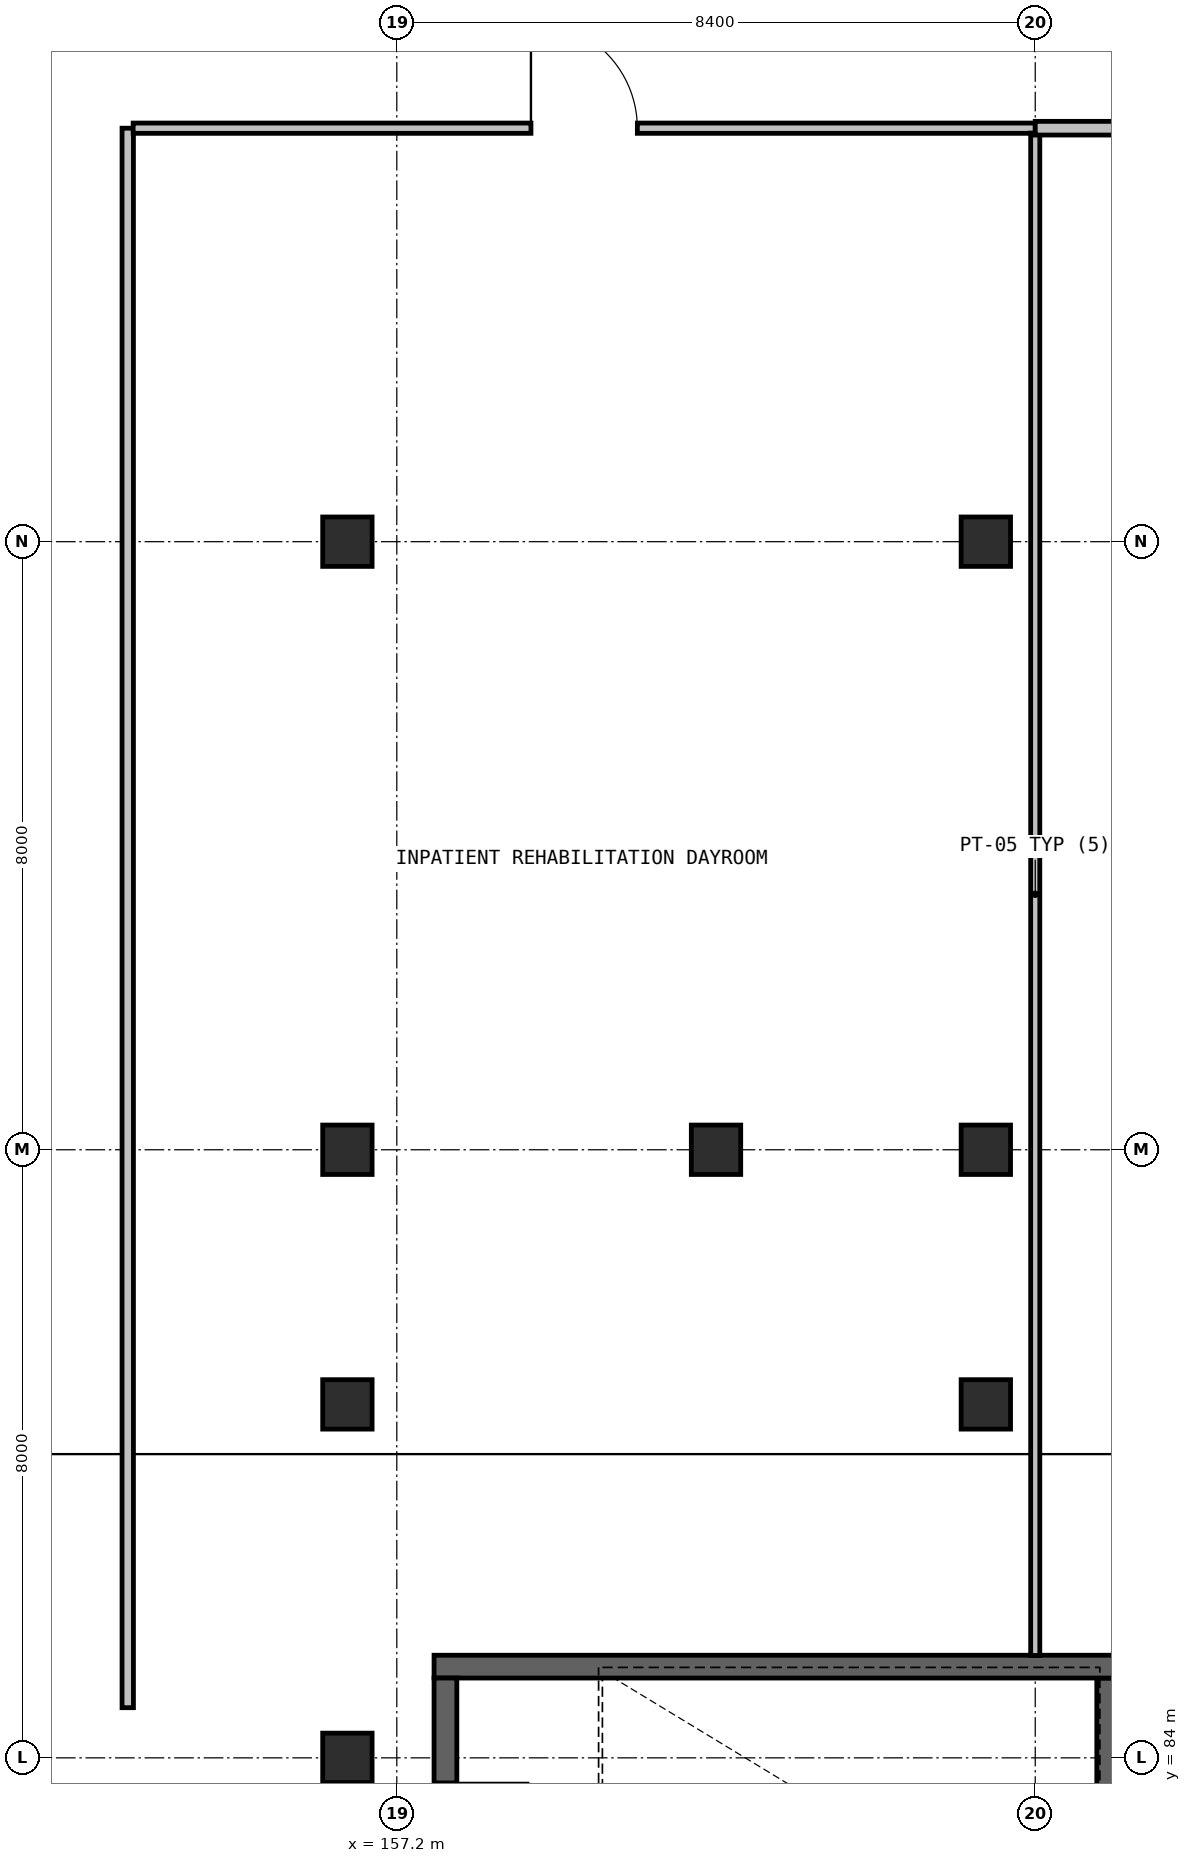
"""IFC4 building model, lengths in metres.
Left out: names, types, materials, properties, quantities, classifications, styles, units other than length and angle.
Written with IfcOpenShell. Run it as: python <this file> out.ifc"""

import sys

from ifc_helpers import new_model, si_unit, direction, frame, frame_2d, origin, origin_2d, place, context, subcontext, project, spatial, rectangle, extrude, element, fill, save


model = new_model("IFC4")
c1 = context("Model", 3, precision=1e-05, world=origin(), true_north=direction((0.0, 1.0)))
c2 = subcontext(c1, "Body", "Model", "MODEL_VIEW")
j1 = project(units=[si_unit("LENGTHUNIT", "METRE"), si_unit("PLANEANGLEUNIT", "RADIAN")], contexts=[c1])
p1 = place(None, origin())
s1 = spatial("IfcSite", under=j1, at=p1, CompositionType="ELEMENT")
p2 = place(p1, origin())
s2 = spatial("IfcBuilding", under=s1, at=p2, CompositionType="ELEMENT")
p3 = place(p2, frame((0.0, 0.0, 23.25)))
s3 = spatial("IfcBuildingStorey", under=s2, at=p3, CompositionType="ELEMENT", Elevation=23.25)
p4 = place(p3, frame((161.4, 92.0, 0.0), z_axis=(0.0, 0.0, 1.0), x_axis=(1.0, 0.0, 0.0)))
e1 = element("IfcColumn", 1, at=p4, inside=s3, PredefinedType="COLUMN", context=c2, shape_type="SweptSolid", body=[
    extrude(rectangle(XDim=0.65, YDim=0.65, at=origin_2d()), origin(), (0.0, 0.0, 1.0), 4.05),
])
p5 = place(p3, frame((156.55, 84.0, 0.0), z_axis=(0.0, 0.0, 1.0), x_axis=(1.0, 0.0, 0.0)))
e2 = element("IfcColumn", 2, at=p5, inside=s3, PredefinedType="COLUMN", context=c2, shape_type="SweptSolid", body=[
    extrude(rectangle(XDim=0.65, YDim=0.65, at=origin_2d()), origin(), (0.0, 0.0, 1.0), 3.762),
])
for number, where, z_axis, x_axis in (
    (3, (156.55, 88.65, 0.0), (0.0, 0.0, 1.0), (1.0, 0.0, 0.0)),
    (4, (156.55, 92.0, 0.0), (0.0, 0.0, 1.0), (1.0, 0.0, 0.0)),
    (5, (156.55, 100.0, 0.0), (0.0, 0.0, 1.0), (1.0, 0.0, 0.0)),
    (6, (164.95, 88.65, 0.0), (0.0, 0.0, 1.0), (1.0, 0.0, 0.0)),
    (7, (164.95, 92.0, 0.0), (0.0, 0.0, 1.0), (1.0, 0.0, 0.0)),
    (8, (164.95, 100.0, 0.0), (0.0, 0.0, 1.0), (1.0, 0.0, 0.0)),
):
    element("IfcColumn", number, at=place(p3, frame(where, z_axis=z_axis, x_axis=x_axis)), inside=s3, PredefinedType="COLUMN", context=c2, shape_type="SweptSolid", body=[
        extrude(rectangle(XDim=0.65, YDim=0.65, at=origin_2d()), origin(), (0.0, 0.0, 1.0), 4.05),
    ])
p6 = place(p3, frame((166.56, 81.19, 0.0), z_axis=(0.0, 0.0, 1.0), x_axis=(0.0, 1.0, 0.0)))
e9 = element("IfcWall", 9, at=p6, inside=s3, PredefinedType="SHEAR", context=c2, shape_type="SweptSolid", body=[
    extrude(rectangle(XDim=3.86, YDim=0.3, at=frame_2d((1.93, 0.0))), origin(), (0.0, 0.0, 1.0), 3.775),
])
p7 = place(p3, frame((166.71, 85.2, 0.0), z_axis=(0.0, 0.0, 1.0), x_axis=(-1.0, 0.0, 0.0)))
e10 = element("IfcWall", 10, at=p7, inside=s3, PredefinedType="SHEAR", context=c2, shape_type="SweptSolid", body=[
    extrude(rectangle(XDim=9.02, YDim=0.3, at=frame_2d((4.51, 0.0))), origin(), (0.0, 0.0, 1.0), 3.775),
])
p8 = place(p3, frame((157.84, 85.05, 0.0), z_axis=(0.0, 0.0, 1.0), x_axis=(0.0, -1.0, 0.0)))
e11 = element("IfcWall", 11, at=p8, inside=s3, PredefinedType="SHEAR", context=c2, shape_type="SweptSolid", body=[
    extrude(rectangle(XDim=3.86, YDim=0.3, at=frame_2d((1.93, 0.0))), origin(), (0.0, 0.0, 1.0), 3.775),
])
p9 = place(p8, frame((1.38, 0.0, 0.0)))
e12 = element("IfcOpeningElement", 12, at=p9, cuts=e11, PredefinedType="OPENING", context=c2, shape_type="SweptSolid", body=[
    extrude(rectangle(XDim=1.1, YDim=2.15, at=frame_2d((0.55, 1.075))), frame((0.0, 0.16, 0.0), z_axis=(0.0, -1.0, 0.0), x_axis=(1.0, 0.0, 0.0)), (0.0, 0.0, 1.0), 0.32),
])
p10 = place(p3, frame((153.66, 84.66, 0.0), z_axis=(0.0, 0.0, 1.0), x_axis=(0.0, 1.0, 0.0)))
e13 = element("IfcWall", 13, at=p10, inside=s3, PredefinedType="PARTITIONING", context=c2, shape_type="SweptSolid", body=[
    extrude(rectangle(XDim=20.78, YDim=0.15, at=frame_2d((10.39, 0.0))), origin(), (0.0, 0.0, 1.0), 3.775),
])
p11 = place(p3, frame((153.731, 105.44, 0.0), z_axis=(0.0, 0.0, 1.0), x_axis=(1.0, 0.0, 0.0)))
e14 = element("IfcWall", 14, at=p11, inside=s3, PredefinedType="PARTITIONING", context=c2, shape_type="SweptSolid", body=[
    extrude(rectangle(XDim=11.869, YDim=0.135, at=frame_2d((5.935, 0.0))), origin(), (0.0, 0.0, 1.0), 3.775),
])
p12 = place(p11, frame((5.234, 0.0, 0.0)))
e15 = element("IfcOpeningElement", 15, at=p12, cuts=e14, PredefinedType="OPENING", context=c2, shape_type="SweptSolid", body=[
    extrude(rectangle(XDim=1.4, YDim=2.15, at=frame_2d((0.7, 1.075))), frame((0.0, 0.077, 0.0), z_axis=(0.0, -1.0, 0.0), x_axis=(1.0, 0.0, 0.0)), (0.0, 0.0, 1.0), 0.155),
])
p13 = place(p3, frame((165.6, 105.376, 0.0), z_axis=(0.0, 0.0, 1.0), x_axis=(0.0, -1.0, 0.0)))
e16 = element("IfcWall", 16, at=p13, inside=s3, PredefinedType="PARTITIONING", context=c2, shape_type="SweptSolid", body=[
    extrude(rectangle(XDim=20.029, YDim=0.12, at=frame_2d((10.015, 0.0))), origin(), (0.0, 0.0, 1.0), 3.775),
])
p14 = place(p3, frame((165.6, 105.44, 0.0), z_axis=(0.0, 0.0, 1.0), x_axis=(1.0, 0.0, 0.0)))
e17 = element("IfcWall", 17, at=p14, inside=s3, PredefinedType="PARTITIONING", context=c2, shape_type="SweptSolid", body=[
    extrude(rectangle(XDim=8.4, YDim=0.18, at=frame_2d((4.2, 0.0))), origin(), (0.0, 0.0, 1.0), 3.775),
])
p15 = place(p14, frame((3.475, 0.0, 0.0)))
e18 = element("IfcOpeningElement", 18, at=p15, cuts=e17, PredefinedType="OPENING", context=c2, shape_type="SweptSolid", body=[
    extrude(rectangle(XDim=1.45, YDim=2.15, at=frame_2d((0.725, 1.075))), frame((0.0, 0.1, 0.0), z_axis=(0.0, -1.0, 0.0), x_axis=(1.0, 0.0, 0.0)), (0.0, 0.0, 1.0), 0.2),
])
p16 = place(p9, origin())
e19 = element("IfcDoor", 19, at=p16, inside=s3, OperationType="SINGLE_SWING_LEFT", PredefinedType="DOOR", context=c2, shape_type="SweptSolid", body=[
    extrude(rectangle(XDim=1.1, YDim=2.15, at=frame_2d((0.55, 1.075))), frame((0.0, 0.025, 0.0), z_axis=(0.0, -1.0, 0.0), x_axis=(1.0, 0.0, 0.0)), (0.0, 0.0, 1.0), 0.05),
])
fill(e12, e19)
p17 = place(p12, origin())
e20 = element("IfcDoor", 20, at=p17, inside=s3, OperationType="SINGLE_SWING_LEFT", PredefinedType="DOOR", context=c2, shape_type="SweptSolid", body=[
    extrude(rectangle(XDim=1.4, YDim=2.15, at=frame_2d((0.7, 1.075))), frame((0.0, 0.025, 0.0), z_axis=(0.0, -1.0, 0.0), x_axis=(1.0, 0.0, 0.0)), (0.0, 0.0, 1.0), 0.05),
])
fill(e15, e20)
save(model, sys.argv[1])
